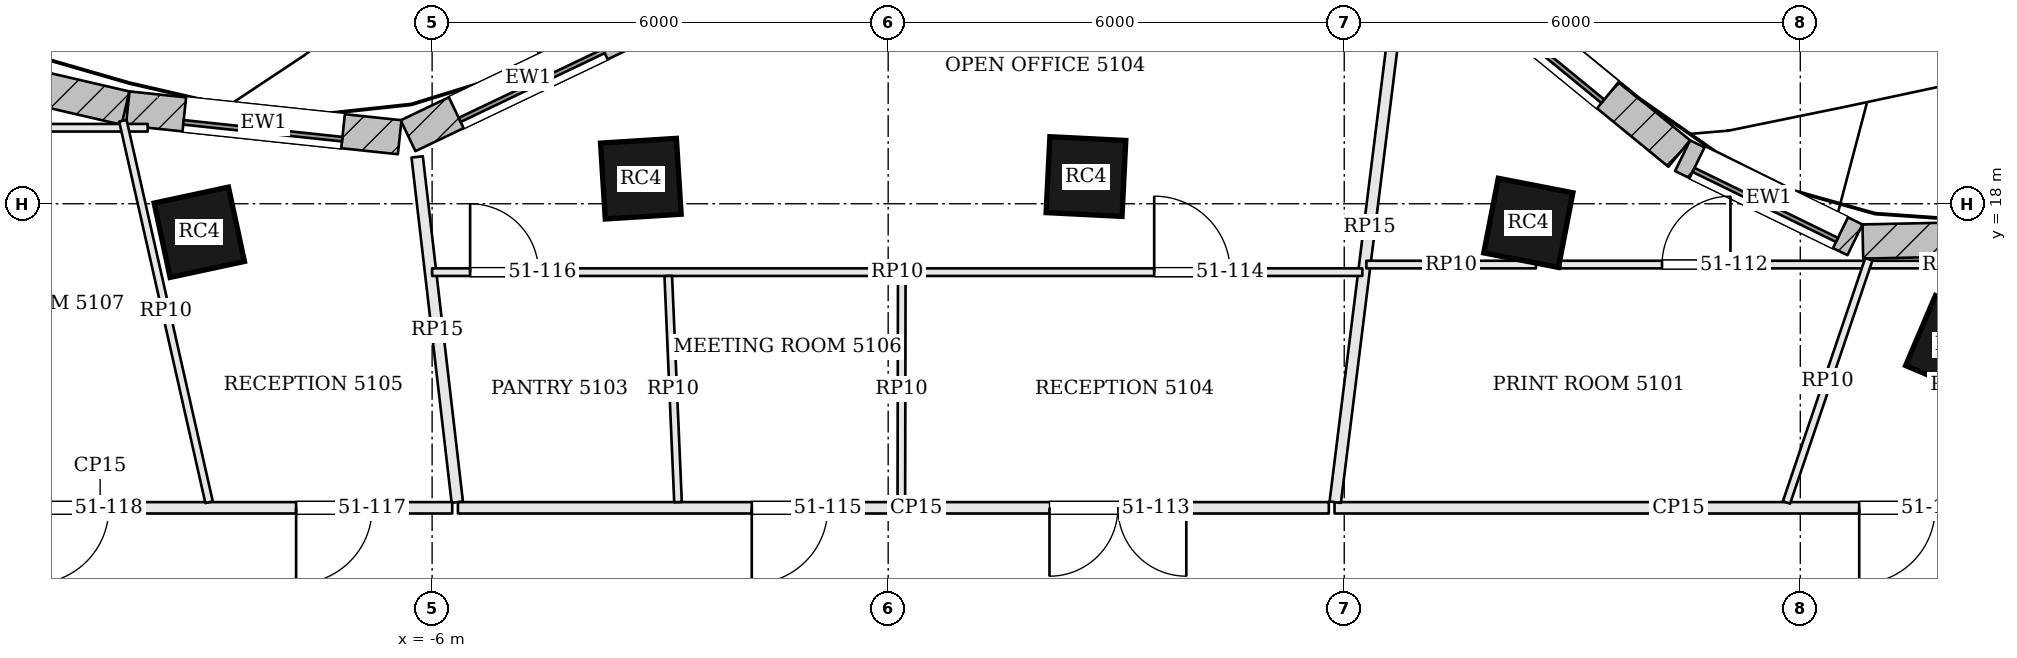
"""IFC4 building model, lengths in metres.
Left out: names, types, materials, properties, quantities, classifications, styles, units other than length and angle.
Written with IfcOpenShell. Run it as: python <this file> out.ifc"""

import sys

from ifc_helpers import new_model, si_unit, direction, frame, frame_2d, origin, origin_2d, place, context, subcontext, project, spatial, rectangle, extrude, element, fill, save


model = new_model("IFC4")
c1 = context("Model", 3, precision=1e-05, world=origin(), true_north=direction((0.0, 1.0)))
c2 = subcontext(c1, "Body", "Model", "MODEL_VIEW")
j1 = project(units=[si_unit("LENGTHUNIT", "METRE"), si_unit("PLANEANGLEUNIT", "RADIAN")], contexts=[c1])
p1 = place(None, origin())
s1 = spatial("IfcSite", under=j1, at=p1, CompositionType="ELEMENT")
p2 = place(p1, origin())
s2 = spatial("IfcBuilding", under=s1, at=p2, CompositionType="ELEMENT")
p3 = place(p2, frame((0.0, 0.0, 209.1)))
s3 = spatial("IfcBuildingStorey", under=s2, at=p3, CompositionType="ELEMENT", Elevation=209.1)
for number, where, z_axis, x_axis in (
    (1, (14.042, 16.136, 0.0), (0.0, 0.0, 1.0), (-0.92, 0.392, 0.0)),
    (2, (8.422, 17.749, 0.0), (0.0, 0.0, 1.0), (-0.982, 0.191, 0.0)),
    (3, (2.602, 18.358, 0.0), (0.0, 0.0, 1.0), (-0.999, 0.05, 0.0)),
    (4, (-3.254, 18.33, 0.0), (0.0, 0.0, 1.0), (-0.998, -0.063, 0.0)),
    (5, (-9.063, 17.625, 0.0), (0.0, 0.0, 1.0), (-0.978, -0.21, 0.0)),
):
    element("IfcColumn", number, at=place(p3, frame(where, z_axis=z_axis, x_axis=x_axis)), inside=s3, PredefinedType="COLUMN", context=c2, shape_type="SweptSolid", body=[
        extrude(rectangle(XDim=1.0, YDim=1.0, at=origin_2d()), origin(), (0.0, 0.0, 1.0), 3.9),
    ])
p4 = place(p3, frame((18.434, 17.622, 0.0), z_axis=(0.0, 0.0, 1.0), x_axis=(-0.999773749739, -0.021270856405, 0.0)))
e6 = element("IfcWall", 6, at=p4, inside=s3, PredefinedType="SOLIDWALL", context=c2, shape_type="SweptSolid", body=[
    extrude(rectangle(XDim=5.613, YDim=0.45, at=frame_2d((2.806, 0.0))), origin(), (0.0, 0.0, 1.0), 3.7),
])
p5 = place(p4, frame((1.756, 0.0, 0.9)))
e7 = element("IfcOpeningElement", 7, at=p5, cuts=e6, PredefinedType="OPENING", context=c2, shape_type="SweptSolid", body=[
    extrude(rectangle(XDim=2.1, YDim=2.3, at=frame_2d((1.05, 1.15))), frame((0.0, 0.235, 0.0), z_axis=(0.0, -1.0, 0.0), x_axis=(1.0, 0.0, 0.0)), (0.0, 0.0, 1.0), 0.47),
])
p6 = place(p3, frame((12.719, 17.526, 0.0), z_axis=(0.0, 0.0, 1.0), x_axis=(-0.898643806462, 0.438679050226, 0.0)))
e8 = element("IfcWall", 8, at=p6, inside=s3, PredefinedType="SOLIDWALL", context=c2, shape_type="SweptSolid", body=[
    extrude(rectangle(XDim=2.523, YDim=0.45, at=frame_2d((1.262, 0.0))), origin(), (0.0, 0.0, 1.0), 3.7),
])
p7 = place(p6, frame((0.212, 0.0, 0.9)))
e9 = element("IfcOpeningElement", 9, at=p7, cuts=e8, PredefinedType="OPENING", context=c2, shape_type="SweptSolid", body=[
    extrude(rectangle(XDim=2.1, YDim=2.3, at=frame_2d((1.05, 1.15))), frame((0.0, 0.235, 0.0), z_axis=(0.0, -1.0, 0.0), x_axis=(1.0, 0.0, 0.0)), (0.0, 0.0, 1.0), 0.47),
])
p8 = place(p3, frame((10.407, 18.661, 0.0), z_axis=(0.0, 0.0, 1.0), x_axis=(-0.773702458947, 0.633549133864, 0.0)))
e10 = element("IfcWall", 10, at=p8, inside=s3, PredefinedType="SOLIDWALL", context=c2, shape_type="SweptSolid", body=[
    extrude(rectangle(XDim=4.526, YDim=0.45, at=frame_2d((2.263, 0.0))), origin(), (0.0, 0.0, 1.0), 3.7),
])
p9 = place(p8, frame((1.213, 0.0, 0.9)))
e11 = element("IfcOpeningElement", 11, at=p9, cuts=e10, PredefinedType="OPENING", context=c2, shape_type="SweptSolid", body=[
    extrude(rectangle(XDim=2.1, YDim=2.3, at=frame_2d((1.05, 1.15))), frame((0.0, 0.235, 0.0), z_axis=(0.0, -1.0, 0.0), x_axis=(1.0, 0.0, 0.0)), (0.0, 0.0, 1.0), 0.47),
])
p10 = place(p3, frame((-3.154, 20.406, 0.0), z_axis=(0.0, 0.0, 1.0), x_axis=(-0.902333313, -0.431038968367, 0.0)))
e12 = element("IfcWall", 12, at=p10, inside=s3, PredefinedType="SOLIDWALL", context=c2, shape_type="SweptSolid", body=[
    extrude(rectangle(XDim=3.505, YDim=0.45, at=frame_2d((1.753, 0.0))), origin(), (0.0, 0.0, 1.0), 3.7),
])
p11 = place(p10, frame((0.703, 0.0, 0.9)))
e13 = element("IfcOpeningElement", 13, at=p11, cuts=e12, PredefinedType="OPENING", context=c2, shape_type="SweptSolid", body=[
    extrude(rectangle(XDim=2.1, YDim=2.3, at=frame_2d((1.05, 1.15))), frame((0.0, 0.235, 0.0), z_axis=(0.0, -1.0, 0.0), x_axis=(1.0, 0.0, 0.0)), (0.0, 0.0, 1.0), 0.47),
])
p12 = place(p3, frame((-6.427, 18.875, 0.0), z_axis=(0.0, 0.0, 1.0), x_axis=(-0.994433468803, 0.10536638992, 0.0)))
e14 = element("IfcWall", 14, at=p12, inside=s3, PredefinedType="SOLIDWALL", context=c2, shape_type="SweptSolid", body=[
    extrude(rectangle(XDim=3.598, YDim=0.45, at=frame_2d((1.799, 0.0))), origin(), (0.0, 0.0, 1.0), 3.7),
])
p13 = place(p12, frame((0.749, 0.0, 0.9)))
e15 = element("IfcOpeningElement", 15, at=p13, cuts=e14, PredefinedType="OPENING", context=c2, shape_type="SweptSolid", body=[
    extrude(rectangle(XDim=2.1, YDim=2.3, at=frame_2d((1.05, 1.15))), frame((0.0, 0.235, 0.0), z_axis=(0.0, -1.0, 0.0), x_axis=(1.0, 0.0, 0.0)), (0.0, 0.0, 1.0), 0.47),
])
p14 = place(p3, frame((-10.034, 19.259, 0.0), z_axis=(0.0, 0.0, 1.0), x_axis=(-0.974223567844, 0.225584662283, 0.0)))
e16 = element("IfcWall", 16, at=p14, inside=s3, PredefinedType="SOLIDWALL", context=c2, shape_type="SweptSolid", body=[
    extrude(rectangle(XDim=5.139, YDim=0.45, at=frame_2d((2.569, 0.0))), origin(), (0.0, 0.0, 1.0), 3.7),
])
p15 = place(p14, frame((1.519, 0.0, 0.9)))
e17 = element("IfcOpeningElement", 17, at=p15, cuts=e16, PredefinedType="OPENING", context=c2, shape_type="SweptSolid", body=[
    extrude(rectangle(XDim=2.1, YDim=2.3, at=frame_2d((1.05, 1.15))), frame((0.0, 0.235, 0.0), z_axis=(0.0, -1.0, 0.0), x_axis=(1.0, 0.0, 0.0)), (0.0, 0.0, 1.0), 0.47),
])
p16 = place(p3, frame((-3.239, 20.594, 3.9), z_axis=(0.0, 0.0, 1.0), x_axis=(-0.902344893923, -0.431014724123, 0.0)))
e18 = element("IfcWall", 18, at=p16, inside=s3, PredefinedType="PARAPET", context=c2, shape_type="SweptSolid", body=[
    extrude(rectangle(XDim=1.49, YDim=0.3, at=frame_2d((0.745, 0.0))), origin(), (0.0, 0.0, 1.0), 1.1),
])
p17 = place(p3, frame((14.925, 14.0, 0.0), z_axis=(0.0, 0.0, 1.0), x_axis=(-1.0, 0.0, 0.0)))
e19 = element("IfcWall", 19, at=p17, inside=s3, PredefinedType="PARTITIONING", context=c2, shape_type="SweptSolid", body=[
    extrude(rectangle(XDim=9.053, YDim=0.15, at=frame_2d((4.526, 0.0))), origin(), (0.0, 0.0, 1.0), 3.084),
])
p18 = place(p17, frame((1.15, 0.0, 0.0)))
e20 = element("IfcOpeningElement", 20, at=p18, cuts=e19, PredefinedType="OPENING", context=c2, shape_type="SweptSolid", body=[
    extrude(rectangle(XDim=1.0, YDim=2.1, at=frame_2d((0.5, 1.05))), frame((0.0, 0.085, 0.0), z_axis=(0.0, -1.0, 0.0), x_axis=(1.0, 0.0, 0.0)), (0.0, 0.0, 1.0), 0.17),
])
p19 = place(p3, frame((6.784, 21.325, 0.0), z_axis=(0.0, 0.0, 1.0), x_axis=(-0.123569990481, -0.992335859199, 0.0)))
e21 = element("IfcWall", 21, at=p19, inside=s3, PredefinedType="PARTITIONING", context=c2, shape_type="SweptSolid", body=[
    extrude(rectangle(XDim=7.306, YDim=0.15, at=frame_2d((3.653, 0.0))), origin(), (0.0, 0.0, 1.0), 3.084),
])
p20 = place(p3, frame((5.797, 14.0, 0.0), z_axis=(0.0, 0.0, 1.0), x_axis=(-1.0, 0.0, 0.0)))
e22 = element("IfcWall", 22, at=p20, inside=s3, PredefinedType="PARTITIONING", context=c2, shape_type="SweptSolid", body=[
    extrude(rectangle(XDim=11.458, YDim=0.15, at=frame_2d((5.729, 0.0))), origin(), (0.0, 0.0, 1.0), 3.084),
])
p21 = place(p20, frame((1.875, 0.0, 0.0)))
e23 = element("IfcOpeningElement", 23, at=p21, cuts=e22, PredefinedType="OPENING", context=c2, shape_type="SweptSolid", body=[
    extrude(rectangle(XDim=1.8, YDim=2.1, at=frame_2d((0.9, 1.05))), frame((0.0, 0.085, 0.0), z_axis=(0.0, -1.0, 0.0), x_axis=(1.0, 0.0, 0.0)), (0.0, 0.0, 1.0), 0.17),
])
p22 = place(p20, frame((6.592, 0.0, 0.0)))
e24 = element("IfcOpeningElement", 24, at=p22, cuts=e22, PredefinedType="OPENING", context=c2, shape_type="SweptSolid", body=[
    extrude(rectangle(XDim=1.0, YDim=2.4, at=frame_2d((0.5, 1.2))), frame((0.0, 0.085, 0.0), z_axis=(0.0, -1.0, 0.0), x_axis=(1.0, 0.0, 0.0)), (0.0, 0.0, 1.0), 0.17),
])
p23 = place(p3, frame((-6.197, 18.616, 0.0), z_axis=(0.0, 0.0, 1.0), x_axis=(0.11538201972, -0.993321191521, 0.0)))
e25 = element("IfcWall", 25, at=p23, inside=s3, PredefinedType="PARTITIONING", context=c2, shape_type="SweptSolid", body=[
    extrude(rectangle(XDim=4.573, YDim=0.15, at=frame_2d((2.286, 0.0))), origin(), (0.0, 0.0, 1.0), 3.084),
])
p24 = place(p3, frame((-5.735, 14.0, 0.0), z_axis=(0.0, 0.0, 1.0), x_axis=(-1.0, 0.0, 0.0)))
e26 = element("IfcWall", 26, at=p24, inside=s3, PredefinedType="PARTITIONING", context=c2, shape_type="SweptSolid", body=[
    extrude(rectangle(XDim=9.265, YDim=0.15, at=frame_2d((4.632, 0.0))), origin(), (0.0, 0.0, 1.0), 3.084),
])
p25 = place(p24, frame((1.054, 0.0, 0.0)))
e27 = element("IfcOpeningElement", 27, at=p25, cuts=e26, PredefinedType="OPENING", context=c2, shape_type="SweptSolid", body=[
    extrude(rectangle(XDim=1.0, YDim=2.1, at=frame_2d((0.5, 1.05))), frame((0.0, 0.085, 0.0), z_axis=(0.0, -1.0, 0.0), x_axis=(1.0, 0.0, 0.0)), (0.0, 0.0, 1.0), 0.17),
])
p26 = place(p24, frame((4.518, 0.0, 0.0)))
e28 = element("IfcOpeningElement", 28, at=p26, cuts=e26, PredefinedType="OPENING", context=c2, shape_type="SweptSolid", body=[
    extrude(rectangle(XDim=1.0, YDim=2.4, at=frame_2d((0.5, 1.2))), frame((0.0, 0.085, 0.0), z_axis=(0.0, -1.0, 0.0), x_axis=(1.0, 0.0, 0.0)), (0.0, 0.0, 1.0), 0.17),
])
p27 = place(p24, frame((7.45, 0.0, 0.0)))
e29 = element("IfcOpeningElement", 29, at=p27, cuts=e26, PredefinedType="OPENING", context=c2, shape_type="SweptSolid", body=[
    extrude(rectangle(XDim=1.0, YDim=2.1, at=frame_2d((0.5, 1.05))), frame((0.0, 0.085, 0.0), z_axis=(0.0, -1.0, 0.0), x_axis=(1.0, 0.0, 0.0)), (0.0, 0.0, 1.0), 0.17),
])
p28 = place(p3, frame((6.291, 17.2, 0.0), z_axis=(0.0, 0.0, 1.0), x_axis=(1.0, 0.0, 0.0)))
e30 = element("IfcWall", 30, at=p28, inside=s3, PredefinedType="PARTITIONING", context=c2, shape_type="SweptSolid", body=[
    extrude(rectangle(XDim=2.23, YDim=0.1, at=frame_2d((1.115, 0.0))), origin(), (0.0, 0.0, 1.0), 3.084),
])
p29 = place(p3, frame((8.845, 17.2, 0.0), z_axis=(0.0, 0.0, 1.0), x_axis=(1.0, 0.0, 0.0)))
e31 = element("IfcWall", 31, at=p29, inside=s3, PredefinedType="PARTITIONING", context=c2, shape_type="SweptSolid", body=[
    extrude(rectangle(XDim=10.204, YDim=0.1, at=frame_2d((5.102, 0.0))), origin(), (0.0, 0.0, 1.0), 3.084),
])
p30 = place(p29, frame((1.336, 0.0, 0.0)))
e32 = element("IfcOpeningElement", 32, at=p30, cuts=e31, PredefinedType="OPENING", context=c2, shape_type="SweptSolid", body=[
    extrude(rectangle(XDim=0.9, YDim=2.1, at=frame_2d((0.45, 1.05))), frame((0.0, 0.06, 0.0), z_axis=(0.0, -1.0, 0.0), x_axis=(1.0, 0.0, 0.0)), (0.0, 0.0, 1.0), 0.12),
])
p31 = place(p3, frame((11.819, 14.071, 0.0), z_axis=(0.0, 0.0, 1.0), x_axis=(0.320648056837, 0.947198407751, 0.0)))
e33 = element("IfcWall", 33, at=p31, inside=s3, PredefinedType="PARTITIONING", context=c2, shape_type="SweptSolid", body=[
    extrude(rectangle(XDim=3.377, YDim=0.1, at=frame_2d((1.689, 0.0))), origin(), (0.0, 0.0, 1.0), 3.084),
])
p32 = place(p3, frame((-6.0, 17.1, 0.0), z_axis=(0.0, 0.0, 1.0), x_axis=(1.0, 0.0, 0.0)))
e34 = element("IfcWall", 34, at=p32, inside=s3, PredefinedType="PARTITIONING", context=c2, shape_type="SweptSolid", body=[
    extrude(rectangle(XDim=12.239, YDim=0.1, at=frame_2d((6.119, 0.0))), origin(), (0.0, 0.0, 1.0), 3.084),
])
p33 = place(p32, frame((9.5, 0.0, 0.0)))
e35 = element("IfcOpeningElement", 35, at=p33, cuts=e34, PredefinedType="OPENING", context=c2, shape_type="SweptSolid", body=[
    extrude(rectangle(XDim=1.0, YDim=2.1, at=frame_2d((0.5, 1.05))), frame((0.0, 0.06, 0.0), z_axis=(0.0, -1.0, 0.0), x_axis=(1.0, 0.0, 0.0)), (0.0, 0.0, 1.0), 0.12),
])
p34 = place(p32, frame((0.5, 0.0, 0.0)))
e36 = element("IfcOpeningElement", 36, at=p34, cuts=e34, PredefinedType="OPENING", context=c2, shape_type="SweptSolid", body=[
    extrude(rectangle(XDim=0.9, YDim=2.1, at=frame_2d((0.45, 1.05))), frame((0.0, 0.06, 0.0), z_axis=(0.0, -1.0, 0.0), x_axis=(1.0, 0.0, 0.0)), (0.0, 0.0, 1.0), 0.12),
])
p35 = place(p3, frame((0.173, 14.075, 0.0), z_axis=(0.0, 0.0, 1.0), x_axis=(0.002051530231, 0.99999789561, 0.0)))
e37 = element("IfcWall", 37, at=p35, inside=s3, PredefinedType="PARTITIONING", context=c2, shape_type="SweptSolid", body=[
    extrude(rectangle(XDim=2.975, YDim=0.1, at=frame_2d((1.488, 0.0))), origin(), (0.0, 0.0, 1.0), 3.084),
])
p36 = place(p3, frame((-2.765, 14.075, 0.0), z_axis=(0.0, 0.0, 1.0), x_axis=(-0.043124132096, 0.999069721907, 0.0)))
e38 = element("IfcWall", 38, at=p36, inside=s3, PredefinedType="PARTITIONING", context=c2, shape_type="SweptSolid", body=[
    extrude(rectangle(XDim=2.978, YDim=0.1, at=frame_2d((1.489, 0.0))), origin(), (0.0, 0.0, 1.0), 3.084),
])
p37 = place(p3, frame((-17.71, 19.0, 0.0), z_axis=(0.0, 0.0, 1.0), x_axis=(1.0, 0.0, 0.0)))
e39 = element("IfcWall", 39, at=p37, inside=s3, PredefinedType="PARTITIONING", context=c2, shape_type="SweptSolid", body=[
    extrude(rectangle(XDim=7.968, YDim=0.1, at=frame_2d((3.984, 0.0))), origin(), (0.0, 0.0, 1.0), 3.084),
])
p38 = place(p37, frame((0.35, 0.0, 0.0)))
e40 = element("IfcOpeningElement", 40, at=p38, cuts=e39, PredefinedType="OPENING", context=c2, shape_type="SweptSolid", body=[
    extrude(rectangle(XDim=0.7, YDim=2.1, at=frame_2d((0.35, 1.05))), frame((0.0, 0.06, 0.0), z_axis=(0.0, -1.0, 0.0), x_axis=(1.0, 0.0, 0.0)), (0.0, 0.0, 1.0), 0.12),
])
p39 = place(p37, frame((3.55, 0.0, 0.0)))
e41 = element("IfcOpeningElement", 41, at=p39, cuts=e39, PredefinedType="OPENING", context=c2, shape_type="SweptSolid", body=[
    extrude(rectangle(XDim=0.9, YDim=2.1, at=frame_2d((0.45, 1.05))), frame((0.0, 0.06, 0.0), z_axis=(0.0, -1.0, 0.0), x_axis=(1.0, 0.0, 0.0)), (0.0, 0.0, 1.0), 0.12),
])
p40 = place(p3, frame((-8.934, 14.073, 0.0), z_axis=(0.0, 0.0, 1.0), x_axis=(-0.22039047917, 0.975411726755, 0.0)))
e42 = element("IfcWall", 42, at=p40, inside=s3, PredefinedType="PARTITIONING", context=c2, shape_type="SweptSolid", body=[
    extrude(rectangle(XDim=5.146, YDim=0.1, at=frame_2d((2.573, 0.0))), origin(), (0.0, 0.0, 1.0), 3.084),
])
p41 = place(p7, origin())
e43 = element("IfcWindow", 43, at=p41, inside=s3, PartitioningType="SINGLE_PANEL", PredefinedType="WINDOW", context=c2, shape_type="SweptSolid", body=[
    extrude(rectangle(XDim=2.1, YDim=2.3, at=frame_2d((1.05, 1.15))), frame((0.0, 0.135, 0.0), z_axis=(0.0, -1.0, 0.0), x_axis=(1.0, 0.0, 0.0)), (0.0, 0.0, 1.0), 0.06),
])
fill(e9, e43)
p42 = place(p9, origin())
e44 = element("IfcWindow", 44, at=p42, inside=s3, PartitioningType="SINGLE_PANEL", PredefinedType="WINDOW", context=c2, shape_type="SweptSolid", body=[
    extrude(rectangle(XDim=2.1, YDim=2.3, at=frame_2d((1.05, 1.15))), frame((0.0, 0.135, 0.0), z_axis=(0.0, -1.0, 0.0), x_axis=(1.0, 0.0, 0.0)), (0.0, 0.0, 1.0), 0.06),
])
fill(e11, e44)
p43 = place(p11, origin())
e45 = element("IfcWindow", 45, at=p43, inside=s3, PartitioningType="SINGLE_PANEL", PredefinedType="WINDOW", context=c2, shape_type="SweptSolid", body=[
    extrude(rectangle(XDim=2.1, YDim=2.3, at=frame_2d((1.05, 1.15))), frame((0.0, 0.135, 0.0), z_axis=(0.0, -1.0, 0.0), x_axis=(1.0, 0.0, 0.0)), (0.0, 0.0, 1.0), 0.06),
])
fill(e13, e45)
p44 = place(p13, origin())
e46 = element("IfcWindow", 46, at=p44, inside=s3, PartitioningType="SINGLE_PANEL", PredefinedType="WINDOW", context=c2, shape_type="SweptSolid", body=[
    extrude(rectangle(XDim=2.1, YDim=2.3, at=frame_2d((1.05, 1.15))), frame((0.0, 0.135, 0.0), z_axis=(0.0, -1.0, 0.0), x_axis=(1.0, 0.0, 0.0)), (0.0, 0.0, 1.0), 0.06),
])
fill(e15, e46)
p45 = place(p30, origin())
e47 = element("IfcDoor", 47, at=p45, inside=s3, OperationType="SINGLE_SWING_RIGHT", PredefinedType="DOOR", context=c2, shape_type="SweptSolid", body=[
    extrude(rectangle(XDim=0.9, YDim=2.1, at=frame_2d((0.45, 1.05))), frame((0.0, 0.025, 0.0), z_axis=(0.0, -1.0, 0.0), x_axis=(1.0, 0.0, 0.0)), (0.0, 0.0, 1.0), 0.05),
])
fill(e32, e47)
p46 = place(p21, origin())
e48 = element("IfcDoor", 48, at=p46, inside=s3, OperationType="DOUBLE_DOOR_SINGLE_SWING", PredefinedType="DOOR", context=c2, shape_type="SweptSolid", body=[
    extrude(rectangle(XDim=1.8, YDim=2.1, at=frame_2d((0.9, 1.05))), frame((0.0, 0.025, 0.0), z_axis=(0.0, -1.0, 0.0), x_axis=(1.0, 0.0, 0.0)), (0.0, 0.0, 1.0), 0.05),
])
fill(e23, e48)
p47 = place(p33, origin())
e49 = element("IfcDoor", 49, at=p47, inside=s3, OperationType="SINGLE_SWING_LEFT", PredefinedType="DOOR", context=c2, shape_type="SweptSolid", body=[
    extrude(rectangle(XDim=1.0, YDim=2.1, at=frame_2d((0.5, 1.05))), frame((0.0, 0.025, 0.0), z_axis=(0.0, -1.0, 0.0), x_axis=(1.0, 0.0, 0.0)), (0.0, 0.0, 1.0), 0.05),
])
fill(e35, e49)
p48 = place(p22, origin())
e50 = element("IfcDoor", 50, at=p48, inside=s3, OperationType="SINGLE_SWING_RIGHT", PredefinedType="DOOR", context=c2, shape_type="SweptSolid", body=[
    extrude(rectangle(XDim=1.0, YDim=2.4, at=frame_2d((0.5, 1.2))), frame((0.0, 0.025, 0.0), z_axis=(0.0, -1.0, 0.0), x_axis=(1.0, 0.0, 0.0)), (0.0, 0.0, 1.0), 0.05),
])
fill(e24, e50)
p49 = place(p34, origin())
e51 = element("IfcDoor", 51, at=p49, inside=s3, OperationType="SINGLE_SWING_LEFT", PredefinedType="DOOR", context=c2, shape_type="SweptSolid", body=[
    extrude(rectangle(XDim=0.9, YDim=2.1, at=frame_2d((0.45, 1.05))), frame((0.0, 0.025, 0.0), z_axis=(0.0, -1.0, 0.0), x_axis=(1.0, 0.0, 0.0)), (0.0, 0.0, 1.0), 0.05),
])
fill(e36, e51)
p50 = place(p25, origin())
e52 = element("IfcDoor", 52, at=p50, inside=s3, OperationType="SINGLE_SWING_RIGHT", PredefinedType="DOOR", context=c2, shape_type="SweptSolid", body=[
    extrude(rectangle(XDim=1.0, YDim=2.1, at=frame_2d((0.5, 1.05))), frame((0.0, 0.025, 0.0), z_axis=(0.0, -1.0, 0.0), x_axis=(1.0, 0.0, 0.0)), (0.0, 0.0, 1.0), 0.05),
])
fill(e27, e52)
p51 = place(p26, origin())
e53 = element("IfcDoor", 53, at=p51, inside=s3, OperationType="SINGLE_SWING_RIGHT", PredefinedType="DOOR", context=c2, shape_type="SweptSolid", body=[
    extrude(rectangle(XDim=1.0, YDim=2.4, at=frame_2d((0.5, 1.2))), frame((0.0, 0.025, 0.0), z_axis=(0.0, -1.0, 0.0), x_axis=(1.0, 0.0, 0.0)), (0.0, 0.0, 1.0), 0.05),
])
fill(e28, e53)
p52 = place(p18, origin())
e54 = element("IfcDoor", 54, at=p52, inside=s3, OperationType="SINGLE_SWING_RIGHT", PredefinedType="DOOR", context=c2, shape_type="SweptSolid", body=[
    extrude(rectangle(XDim=1.0, YDim=2.1, at=frame_2d((0.5, 1.05))), frame((0.0, 0.025, 0.0), z_axis=(0.0, -1.0, 0.0), x_axis=(1.0, 0.0, 0.0)), (0.0, 0.0, 1.0), 0.05),
])
fill(e20, e54)
save(model, sys.argv[1])
